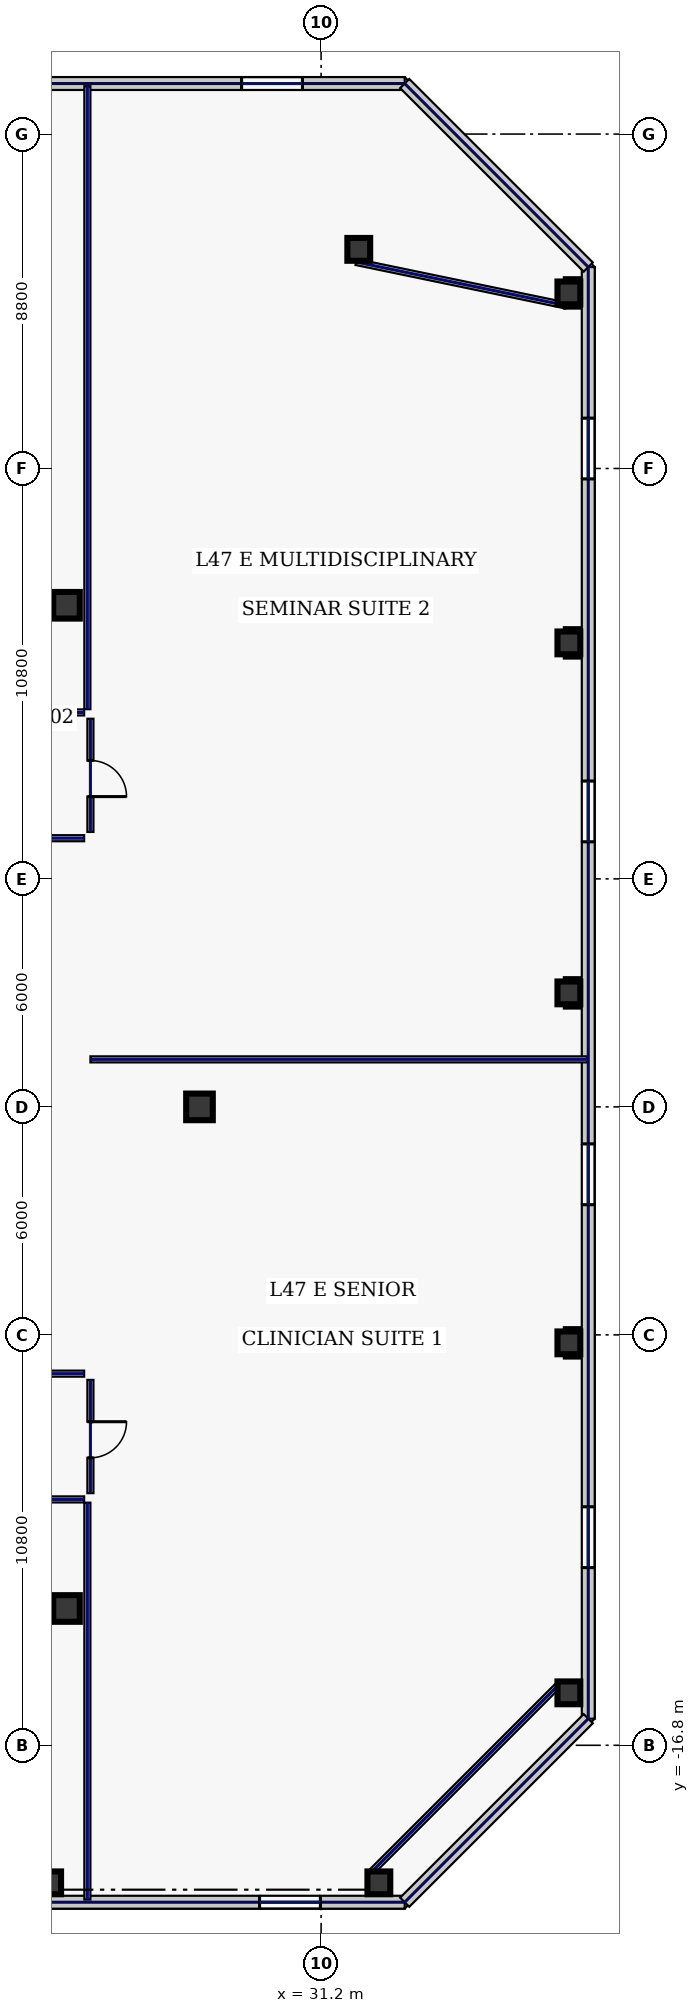
"""IFC4 building model, lengths in metres.
Left out: names, types, materials, properties, quantities, classifications, styles, units other than length and angle.
Written with IfcOpenShell. Run it as: python <this file> out.ifc"""

import sys

from ifc_helpers import new_model, si_unit, direction, frame, frame_2d, origin, origin_2d, place, context, subcontext, project, spatial, rectangle, hollow_rectangle, extrude, element, fill, save


model = new_model("IFC4")
c1 = context("Model", 3, precision=1e-05, world=origin(), true_north=direction((0.0, 1.0)))
c2 = subcontext(c1, "Body", "Model", "MODEL_VIEW")
j1 = project(units=[si_unit("LENGTHUNIT", "METRE"), si_unit("PLANEANGLEUNIT", "RADIAN")], contexts=[c1])
p1 = place(None, origin())
s1 = spatial("IfcSite", under=j1, at=p1, CompositionType="ELEMENT")
p2 = place(p1, origin())
s2 = spatial("IfcBuilding", under=s1, at=p2, CompositionType="ELEMENT")
p3 = place(p2, frame((0.0, 0.0, 204.2)))
s3 = spatial("IfcBuildingStorey", under=s2, at=p3, CompositionType="ELEMENT", Elevation=204.2)
for number, where, z_axis, x_axis in (
    (1, (24.5, -13.2, 0.0), (0.0, 0.0, 1.0), (1.0, 0.0, 0.0)),
    (2, (24.5, 13.2, 0.0), (0.0, 0.0, 1.0), (1.0, 0.0, 0.0)),
    (3, (28.0, 0.0, 0.0), (0.0, 0.0, 1.0), (1.0, 0.0, 0.0)),
):
    element("IfcColumn", number, at=place(p3, frame(where, z_axis=z_axis, x_axis=x_axis)), inside=s3, PredefinedType="COLUMN", context=c2, shape_type="SweptSolid", body=[
        extrude(hollow_rectangle(XDim=0.7, YDim=0.7, WallThickness=0.032, at=origin_2d()), origin(), (0.0, 0.0, 1.0), 3.68),
    ])
for number, where, z_axis, x_axis in (
    (4, (24.057, -20.42, 0.0), (0.0, 0.0, 1.0), (1.0, 0.0, 0.0)),
    (5, (32.72, -20.42, 0.0), (0.0, 0.0, 1.0), (1.0, 0.0, 0.0)),
    (6, (32.191, 22.566, 0.0), (0.0, 0.0, 1.0), (1.0, 0.0, 0.0)),
    (7, (37.72, -15.42, 0.0), (0.0, 0.0, 1.0), (1.0, 0.0, 0.0)),
    (8, (37.72, -6.21, 0.0), (0.0, 0.0, 1.0), (1.0, 0.0, 0.0)),
    (9, (37.72, 3.0, 0.0), (0.0, 0.0, 1.0), (1.0, 0.0, 0.0)),
    (10, (37.72, 12.21, 0.0), (0.0, 0.0, 1.0), (1.0, 0.0, 0.0)),
    (11, (37.72, 21.42, 0.0), (0.0, 0.0, 1.0), (1.0, 0.0, 0.0)),
):
    element("IfcColumn", number, at=place(p3, frame(where, z_axis=z_axis, x_axis=x_axis)), inside=s3, PredefinedType="COLUMN", context=c2, shape_type="SweptSolid", body=[
        extrude(hollow_rectangle(XDim=0.6, YDim=0.6, WallThickness=0.028, at=origin_2d()), origin(), (0.0, 0.0, 1.0), 3.68),
    ])
p4 = place(p3, frame((13.463, -20.93, 0.0), z_axis=(0.0, 0.0, 1.0), x_axis=(1.0, 0.0, 0.0)))
e12 = element("IfcWall", 12, at=p4, inside=s3, PredefinedType="STANDARD", context=c2, shape_type="SweptSolid", body=[
    extrude(rectangle(XDim=19.937, YDim=0.34, at=frame_2d((9.969, 0.0))), origin(), (0.0, 0.0, 1.0), 3.68),
])
p5 = place(p4, frame((3.47, 0.0, 0.22)))
e13 = element("IfcOpeningElement", 13, at=p5, cuts=e12, PredefinedType="OPENING", context=c2, shape_type="SweptSolid", body=[
    extrude(rectangle(XDim=1.6, YDim=1.2, at=frame_2d((0.8, 0.6))), frame((0.0, 0.18, 0.0), z_axis=(0.0, -1.0, 0.0), x_axis=(1.0, 0.0, 0.0)), (0.0, 0.0, 1.0), 0.36),
])
p6 = place(p4, frame((7.455, 0.0, 0.22)))
e14 = element("IfcOpeningElement", 14, at=p6, cuts=e12, PredefinedType="OPENING", context=c2, shape_type="SweptSolid", body=[
    extrude(rectangle(XDim=1.6, YDim=1.2, at=frame_2d((0.8, 0.6))), frame((0.0, 0.18, 0.0), z_axis=(0.0, -1.0, 0.0), x_axis=(1.0, 0.0, 0.0)), (0.0, 0.0, 1.0), 0.36),
])
p7 = place(p4, frame((16.118, 0.0, 0.22)))
e15 = element("IfcOpeningElement", 15, at=p7, cuts=e12, PredefinedType="OPENING", context=c2, shape_type="SweptSolid", body=[
    extrude(rectangle(XDim=1.6, YDim=1.2, at=frame_2d((0.8, 0.6))), frame((0.0, 0.18, 0.0), z_axis=(0.0, -1.0, 0.0), x_axis=(1.0, 0.0, 0.0)), (0.0, 0.0, 1.0), 0.36),
])
p8 = place(p3, frame((33.4, 26.93, 0.0), z_axis=(0.0, 0.0, 1.0), x_axis=(-1.0, 0.0, 0.0)))
e16 = element("IfcWall", 16, at=p8, inside=s3, PredefinedType="STANDARD", context=c2, shape_type="SweptSolid", body=[
    extrude(rectangle(XDim=20.09, YDim=0.34, at=frame_2d((10.045, 0.0))), origin(), (0.0, 0.0, 1.0), 2.075),
])
p9 = place(p8, frame((2.691, 0.0, 0.22)))
e17 = element("IfcOpeningElement", 17, at=p9, cuts=e16, PredefinedType="OPENING", context=c2, shape_type="SweptSolid", body=[
    extrude(rectangle(XDim=1.6, YDim=1.2, at=frame_2d((0.8, 0.6))), frame((0.0, 0.18, 0.0), z_axis=(0.0, -1.0, 0.0), x_axis=(1.0, 0.0, 0.0)), (0.0, 0.0, 1.0), 0.36),
])
p10 = place(p3, frame((38.23, -16.1, 0.0), z_axis=(0.0, 0.0, 1.0), x_axis=(0.0, 1.0, 0.0)))
e18 = element("IfcWall", 18, at=p10, inside=s3, PredefinedType="STANDARD", context=c2, shape_type="SweptSolid", body=[
    extrude(rectangle(XDim=38.2, YDim=0.34, at=frame_2d((19.1, 0.0))), origin(), (0.0, 0.0, 1.0), 3.68),
])
p11 = place(p10, frame((3.975, 0.0, 0.22)))
e19 = element("IfcOpeningElement", 19, at=p11, cuts=e18, PredefinedType="OPENING", context=c2, shape_type="SweptSolid", body=[
    extrude(rectangle(XDim=1.6, YDim=1.2, at=frame_2d((0.8, 0.6))), frame((0.0, 0.18, 0.0), z_axis=(0.0, -1.0, 0.0), x_axis=(1.0, 0.0, 0.0)), (0.0, 0.0, 1.0), 0.36),
])
p12 = place(p10, frame((13.525, 0.0, 0.22)))
e20 = element("IfcOpeningElement", 20, at=p12, cuts=e18, PredefinedType="OPENING", context=c2, shape_type="SweptSolid", body=[
    extrude(rectangle(XDim=1.6, YDim=1.2, at=frame_2d((0.8, 0.6))), frame((0.0, 0.18, 0.0), z_axis=(0.0, -1.0, 0.0), x_axis=(1.0, 0.0, 0.0)), (0.0, 0.0, 1.0), 0.36),
])
p13 = place(p10, frame((23.075, 0.0, 0.22)))
e21 = element("IfcOpeningElement", 21, at=p13, cuts=e18, PredefinedType="OPENING", context=c2, shape_type="SweptSolid", body=[
    extrude(rectangle(XDim=1.6, YDim=1.2, at=frame_2d((0.8, 0.6))), frame((0.0, 0.18, 0.0), z_axis=(0.0, -1.0, 0.0), x_axis=(1.0, 0.0, 0.0)), (0.0, 0.0, 1.0), 0.36),
])
p14 = place(p10, frame((32.625, 0.0, 0.22)))
e22 = element("IfcOpeningElement", 22, at=p14, cuts=e18, PredefinedType="OPENING", context=c2, shape_type="SweptSolid", body=[
    extrude(rectangle(XDim=1.6, YDim=1.2, at=frame_2d((0.8, 0.6))), frame((0.0, 0.18, 0.0), z_axis=(0.0, -1.0, 0.0), x_axis=(1.0, 0.0, 0.0)), (0.0, 0.0, 1.0), 0.36),
])
for number, where, z_axis, x_axis in (
    (23, (33.4, -20.93, 0.0), (0.0, 0.0, 1.0), (0.707, 0.707, 0.0)),
    (24, (38.23, 22.1, 0.0), (0.0, 0.0, 1.0), (-0.707, 0.707, 0.0)),
):
    element("IfcWall", number, at=place(p3, frame(where, z_axis=z_axis, x_axis=x_axis)), inside=s3, PredefinedType="STANDARD", context=c2, shape_type="SweptSolid", body=[
        extrude(rectangle(XDim=6.831, YDim=0.34, at=frame_2d((3.415, 0.0))), origin(), (0.0, 0.0, 1.0), 3.68),
    ])
p15 = place(p3, frame((32.479, -20.18, 0.0), z_axis=(0.0, 0.0, 1.0), x_axis=(0.707106781187, 0.707106781187, 0.0)))
e25 = element("IfcWall", 25, at=p15, inside=s3, PredefinedType="PARTITIONING", context=c2, shape_type="SweptSolid", body=[
    extrude(rectangle(XDim=7.071, YDim=0.16, at=frame_2d((3.536, 0.0))), origin(), (0.0, 0.0, 1.0), 1.475),
])
p16 = place(p3, frame((37.651, 21.087, 0.0), z_axis=(0.0, 0.0, 1.0), x_axis=(-0.979184618318, 0.202971631636, 0.0)))
e26 = element("IfcWall", 26, at=p16, inside=s3, PredefinedType="PARTITIONING", context=c2, shape_type="SweptSolid", body=[
    extrude(rectangle(XDim=5.646, YDim=0.16, at=frame_2d((2.823, 0.0))), origin(), (0.0, 0.0, 1.0), 1.475),
])
p17 = place(p3, frame((-24.965, 10.38, 0.0), z_axis=(0.0, 0.0, 1.0), x_axis=(1.0, 0.0, 0.0)))
e27 = element("IfcWall", 27, at=p17, inside=s3, PredefinedType="PARTITIONING", context=c2, shape_type="SweptSolid", body=[
    extrude(rectangle(XDim=49.93, YDim=0.16, at=frame_2d((24.965, 0.0))), origin(), (0.0, 0.0, 1.0), 3.68),
])
p18 = place(p17, frame((2.044, 0.0, 0.0)))
e28 = element("IfcOpeningElement", 28, at=p18, cuts=e27, PredefinedType="OPENING", context=c2, shape_type="SweptSolid", body=[
    extrude(rectangle(XDim=0.95, YDim=2.2, at=frame_2d((0.475, 1.1))), frame((0.0, 0.09, 0.0), z_axis=(0.0, -1.0, 0.0), x_axis=(1.0, 0.0, 0.0)), (0.0, 0.0, 1.0), 0.18),
])
p19 = place(p17, frame((7.3, 0.0, 0.0)))
e29 = element("IfcOpeningElement", 29, at=p19, cuts=e27, PredefinedType="OPENING", context=c2, shape_type="SweptSolid", body=[
    extrude(rectangle(XDim=1.15, YDim=2.2, at=frame_2d((0.575, 1.1))), frame((0.0, 0.09, 0.0), z_axis=(0.0, -1.0, 0.0), x_axis=(1.0, 0.0, 0.0)), (0.0, 0.0, 1.0), 0.18),
])
p20 = place(p17, frame((13.1, 0.0, 0.0)))
e30 = element("IfcOpeningElement", 30, at=p20, cuts=e27, PredefinedType="OPENING", context=c2, shape_type="SweptSolid", body=[
    extrude(rectangle(XDim=0.95, YDim=2.2, at=frame_2d((0.475, 1.1))), frame((0.0, 0.09, 0.0), z_axis=(0.0, -1.0, 0.0), x_axis=(1.0, 0.0, 0.0)), (0.0, 0.0, 1.0), 0.18),
])
p21 = place(p17, frame((19.275, 0.0, 0.0)))
e31 = element("IfcOpeningElement", 31, at=p21, cuts=e27, PredefinedType="OPENING", context=c2, shape_type="SweptSolid", body=[
    extrude(rectangle(XDim=1.05, YDim=2.2, at=frame_2d((0.525, 1.1))), frame((0.0, 0.09, 0.0), z_axis=(0.0, -1.0, 0.0), x_axis=(1.0, 0.0, 0.0)), (0.0, 0.0, 1.0), 0.18),
])
p22 = place(p17, frame((28.055, 0.0, 0.0)))
e32 = element("IfcOpeningElement", 32, at=p22, cuts=e27, PredefinedType="OPENING", context=c2, shape_type="SweptSolid", body=[
    extrude(rectangle(XDim=0.95, YDim=2.2, at=frame_2d((0.475, 1.1))), frame((0.0, 0.09, 0.0), z_axis=(0.0, -1.0, 0.0), x_axis=(1.0, 0.0, 0.0)), (0.0, 0.0, 1.0), 0.18),
])
p23 = place(p17, frame((37.055, 0.0, 0.0)))
e33 = element("IfcOpeningElement", 33, at=p23, cuts=e27, PredefinedType="OPENING", context=c2, shape_type="SweptSolid", body=[
    extrude(rectangle(XDim=0.95, YDim=2.2, at=frame_2d((0.475, 1.1))), frame((0.0, 0.09, 0.0), z_axis=(0.0, -1.0, 0.0), x_axis=(1.0, 0.0, 0.0)), (0.0, 0.0, 1.0), 0.18),
])
p24 = place(p17, frame((42.875, 0.0, 0.0)))
e34 = element("IfcOpeningElement", 34, at=p24, cuts=e27, PredefinedType="OPENING", context=c2, shape_type="SweptSolid", body=[
    extrude(rectangle(XDim=0.95, YDim=2.2, at=frame_2d((0.475, 1.1))), frame((0.0, 0.09, 0.0), z_axis=(0.0, -1.0, 0.0), x_axis=(1.0, 0.0, 0.0)), (0.0, 0.0, 1.0), 0.18),
])
p25 = place(p17, frame((45.906, 0.0, 0.0)))
e35 = element("IfcOpeningElement", 35, at=p25, cuts=e27, PredefinedType="OPENING", context=c2, shape_type="SweptSolid", body=[
    extrude(rectangle(XDim=0.95, YDim=2.2, at=frame_2d((0.475, 1.1))), frame((0.0, 0.09, 0.0), z_axis=(0.0, -1.0, 0.0), x_axis=(1.0, 0.0, 0.0)), (0.0, 0.0, 1.0), 0.18),
])
p26 = place(p3, frame((25.13, 10.215, 0.0), z_axis=(0.0, 0.0, 1.0), x_axis=(0.0, -1.0, 0.0)))
e36 = element("IfcWall", 36, at=p26, inside=s3, PredefinedType="PARTITIONING", context=c2, shape_type="SweptSolid", body=[
    extrude(rectangle(XDim=2.98, YDim=0.16, at=frame_2d((1.49, 0.0))), origin(), (0.0, 0.0, 1.0), 3.68),
])
p27 = place(p26, frame((1.1, 0.0, 0.0)))
e37 = element("IfcOpeningElement", 37, at=p27, cuts=e36, PredefinedType="OPENING", context=c2, shape_type="SweptSolid", body=[
    extrude(rectangle(XDim=0.95, YDim=2.2, at=frame_2d((0.475, 1.1))), frame((0.0, 0.09, 0.0), z_axis=(0.0, -1.0, 0.0), x_axis=(1.0, 0.0, 0.0)), (0.0, 0.0, 1.0), 0.18),
])
for number, where, z_axis, x_axis in (
    (38, (24.965, 7.07, 0.0), (0.0, 0.0, 1.0), (-1.0, 0.0, 0.0)),
    (39, (10.715, -7.02, 0.0), (0.0, 0.0, 1.0), (1.0, 0.0, 0.0)),
):
    element("IfcWall", number, at=place(p3, frame(where, z_axis=z_axis, x_axis=x_axis)), inside=s3, PredefinedType="PARTITIONING", context=c2, shape_type="SweptSolid", body=[
        extrude(rectangle(XDim=14.25, YDim=0.16, at=frame_2d((7.125, 0.0))), origin(), (0.0, 0.0, 1.0), 3.68),
    ])
p28 = place(p3, frame((25.13, -7.185, 0.0), z_axis=(0.0, 0.0, 1.0), x_axis=(0.0, -1.0, 0.0)))
e40 = element("IfcWall", 40, at=p28, inside=s3, PredefinedType="PARTITIONING", context=c2, shape_type="SweptSolid", body=[
    extrude(rectangle(XDim=2.98, YDim=0.16, at=frame_2d((1.49, 0.0))), origin(), (0.0, 0.0, 1.0), 3.68),
])
p29 = place(p28, frame((1.1, 0.0, 0.0)))
e41 = element("IfcOpeningElement", 41, at=p29, cuts=e40, PredefinedType="OPENING", context=c2, shape_type="SweptSolid", body=[
    extrude(rectangle(XDim=0.95, YDim=2.2, at=frame_2d((0.475, 1.1))), frame((0.0, 0.09, 0.0), z_axis=(0.0, -1.0, 0.0), x_axis=(1.0, 0.0, 0.0)), (0.0, 0.0, 1.0), 0.18),
])
p30 = place(p3, frame((24.965, -10.33, 0.0), z_axis=(0.0, 0.0, 1.0), x_axis=(-1.0, 0.0, 0.0)))
e42 = element("IfcWall", 42, at=p30, inside=s3, PredefinedType="PARTITIONING", context=c2, shape_type="SweptSolid", body=[
    extrude(rectangle(XDim=49.93, YDim=0.16, at=frame_2d((24.965, 0.0))), origin(), (0.0, 0.0, 1.0), 3.68),
])
p31 = place(p30, frame((44.486, 0.0, 0.0)))
e43 = element("IfcOpeningElement", 43, at=p31, cuts=e42, PredefinedType="OPENING", context=c2, shape_type="SweptSolid", body=[
    extrude(rectangle(XDim=1.05, YDim=2.2, at=frame_2d((0.525, 1.1))), frame((0.0, 0.09, 0.0), z_axis=(0.0, -1.0, 0.0), x_axis=(1.0, 0.0, 0.0)), (0.0, 0.0, 1.0), 0.18),
])
p32 = place(p30, frame((31.92, 0.0, 0.0)))
e44 = element("IfcOpeningElement", 44, at=p32, cuts=e42, PredefinedType="OPENING", context=c2, shape_type="SweptSolid", body=[
    extrude(rectangle(XDim=0.95, YDim=2.2, at=frame_2d((0.475, 1.1))), frame((0.0, 0.09, 0.0), z_axis=(0.0, -1.0, 0.0), x_axis=(1.0, 0.0, 0.0)), (0.0, 0.0, 1.0), 0.18),
])
p33 = place(p30, frame((16.74, 0.0, 0.0)))
e45 = element("IfcOpeningElement", 45, at=p33, cuts=e42, PredefinedType="OPENING", context=c2, shape_type="SweptSolid", body=[
    extrude(rectangle(XDim=0.95, YDim=2.2, at=frame_2d((0.475, 1.1))), frame((0.0, 0.09, 0.0), z_axis=(0.0, -1.0, 0.0), x_axis=(1.0, 0.0, 0.0)), (0.0, 0.0, 1.0), 0.18),
])
p34 = place(p30, frame((4.644, 0.0, 0.0)))
e46 = element("IfcOpeningElement", 46, at=p34, cuts=e42, PredefinedType="OPENING", context=c2, shape_type="SweptSolid", body=[
    extrude(rectangle(XDim=0.95, YDim=2.2, at=frame_2d((0.475, 1.1))), frame((0.0, 0.09, 0.0), z_axis=(0.0, -1.0, 0.0), x_axis=(1.0, 0.0, 0.0)), (0.0, 0.0, 1.0), 0.18),
])
p35 = place(p3, frame((25.05, 10.465, 0.0), z_axis=(0.0, 0.0, 1.0), x_axis=(0.0, 1.0, 0.0)))
e47 = element("IfcWall", 47, at=p35, inside=s3, PredefinedType="PARTITIONING", context=c2, shape_type="SweptSolid", body=[
    extrude(rectangle(XDim=16.395, YDim=0.16, at=frame_2d((8.198, 0.0))), origin(), (0.0, 0.0, 1.0), 3.68),
])
p36 = place(p3, frame((25.05, -20.86, 0.0), z_axis=(0.0, 0.0, 1.0), x_axis=(0.0, 1.0, 0.0)))
e48 = element("IfcWall", 48, at=p36, inside=s3, PredefinedType="PARTITIONING", context=c2, shape_type="SweptSolid", body=[
    extrude(rectangle(XDim=10.445, YDim=0.16, at=frame_2d((5.223, 0.0))), origin(), (0.0, 0.0, 1.0), 3.68),
])
p37 = place(p3, frame((25.13, 1.25, 0.0), z_axis=(0.0, 0.0, 1.0), x_axis=(1.0, 0.0, 0.0)))
e49 = element("IfcWall", 49, at=p37, inside=s3, PredefinedType="PARTITIONING", context=c2, shape_type="SweptSolid", body=[
    extrude(rectangle(XDim=13.08, YDim=0.16, at=frame_2d((6.54, 0.0))), origin(), (0.0, 0.0, 1.0), 3.68),
])
p38 = place(p7, origin())
e50 = element("IfcWindow", 50, at=p38, inside=s3, PartitioningType="SINGLE_PANEL", PredefinedType="WINDOW", context=c2, shape_type="SweptSolid", body=[
    extrude(rectangle(XDim=1.6, YDim=1.2, at=frame_2d((0.8, 0.6))), frame((0.0, 0.03, 0.0), z_axis=(0.0, -1.0, 0.0), x_axis=(1.0, 0.0, 0.0)), (0.0, 0.0, 1.0), 0.06),
])
fill(e15, e50)
p39 = place(p9, origin())
e51 = element("IfcWindow", 51, at=p39, inside=s3, PartitioningType="SINGLE_PANEL", PredefinedType="WINDOW", context=c2, shape_type="SweptSolid", body=[
    extrude(rectangle(XDim=1.6, YDim=1.2, at=frame_2d((0.8, 0.6))), frame((0.0, 0.03, 0.0), z_axis=(0.0, -1.0, 0.0), x_axis=(1.0, 0.0, 0.0)), (0.0, 0.0, 1.0), 0.06),
])
fill(e17, e51)
p40 = place(p11, origin())
e52 = element("IfcWindow", 52, at=p40, inside=s3, PartitioningType="SINGLE_PANEL", PredefinedType="WINDOW", context=c2, shape_type="SweptSolid", body=[
    extrude(rectangle(XDim=1.6, YDim=1.2, at=frame_2d((0.8, 0.6))), frame((0.0, 0.03, 0.0), z_axis=(0.0, -1.0, 0.0), x_axis=(1.0, 0.0, 0.0)), (0.0, 0.0, 1.0), 0.06),
])
fill(e19, e52)
p41 = place(p12, origin())
e53 = element("IfcWindow", 53, at=p41, inside=s3, PartitioningType="SINGLE_PANEL", PredefinedType="WINDOW", context=c2, shape_type="SweptSolid", body=[
    extrude(rectangle(XDim=1.6, YDim=1.2, at=frame_2d((0.8, 0.6))), frame((0.0, 0.03, 0.0), z_axis=(0.0, -1.0, 0.0), x_axis=(1.0, 0.0, 0.0)), (0.0, 0.0, 1.0), 0.06),
])
fill(e20, e53)
p42 = place(p13, origin())
e54 = element("IfcWindow", 54, at=p42, inside=s3, PartitioningType="SINGLE_PANEL", PredefinedType="WINDOW", context=c2, shape_type="SweptSolid", body=[
    extrude(rectangle(XDim=1.6, YDim=1.2, at=frame_2d((0.8, 0.6))), frame((0.0, 0.03, 0.0), z_axis=(0.0, -1.0, 0.0), x_axis=(1.0, 0.0, 0.0)), (0.0, 0.0, 1.0), 0.06),
])
fill(e21, e54)
p43 = place(p14, origin())
e55 = element("IfcWindow", 55, at=p43, inside=s3, PartitioningType="SINGLE_PANEL", PredefinedType="WINDOW", context=c2, shape_type="SweptSolid", body=[
    extrude(rectangle(XDim=1.6, YDim=1.2, at=frame_2d((0.8, 0.6))), frame((0.0, 0.03, 0.0), z_axis=(0.0, -1.0, 0.0), x_axis=(1.0, 0.0, 0.0)), (0.0, 0.0, 1.0), 0.06),
])
fill(e22, e55)
p44 = place(p29, origin())
e56 = element("IfcDoor", 56, at=p44, inside=s3, OperationType="SINGLE_SWING_LEFT", PredefinedType="DOOR", context=c2, shape_type="SweptSolid", body=[
    extrude(rectangle(XDim=0.95, YDim=2.2, at=frame_2d((0.475, 1.1))), frame((0.0, 0.025, 0.0), z_axis=(0.0, -1.0, 0.0), x_axis=(1.0, 0.0, 0.0)), (0.0, 0.0, 1.0), 0.05),
])
fill(e41, e56)
p45 = place(p27, origin())
e57 = element("IfcDoor", 57, at=p45, inside=s3, OperationType="SINGLE_SWING_RIGHT", PredefinedType="DOOR", context=c2, shape_type="SweptSolid", body=[
    extrude(rectangle(XDim=0.95, YDim=2.2, at=frame_2d((0.475, 1.1))), frame((0.0, 0.025, 0.0), z_axis=(0.0, -1.0, 0.0), x_axis=(1.0, 0.0, 0.0)), (0.0, 0.0, 1.0), 0.05),
])
fill(e37, e57)
save(model, sys.argv[1])
